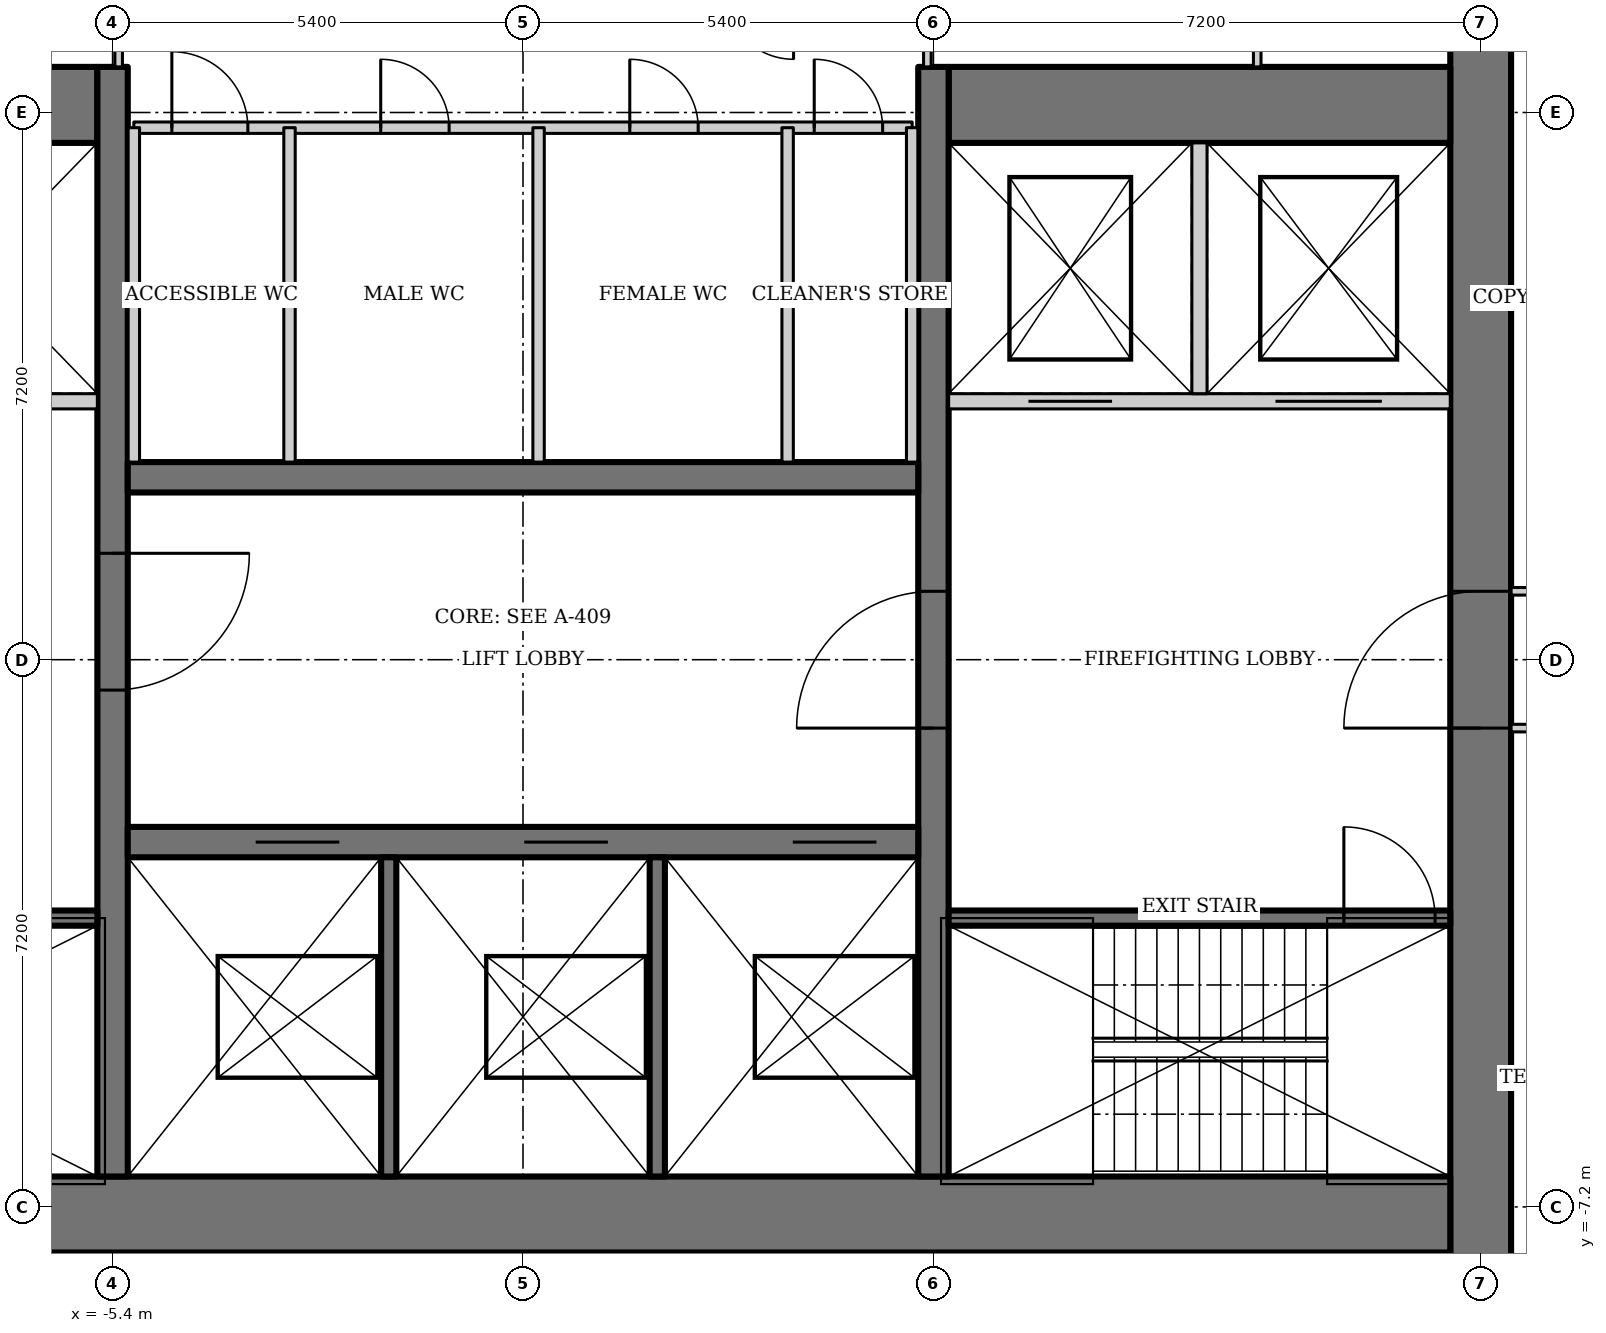
"""IFC4 building model, lengths in metres.
Left out: names, types, materials, properties, quantities, classifications, styles, units other than length and angle.
Written with IfcOpenShell. Run it as: python <this file> out.ifc"""

import sys

from ifc_helpers import new_model, si_unit, direction, frame, frame_2d, origin, place, context, subcontext, project, spatial, rectangle, extrude, element, fill, save


model = new_model("IFC4")
c1 = context("Model", 3, precision=1e-05, world=origin(), true_north=direction((0.0, 1.0)))
c2 = subcontext(c1, "Body", "Model", "MODEL_VIEW")
j1 = project(units=[si_unit("LENGTHUNIT", "METRE"), si_unit("PLANEANGLEUNIT", "RADIAN")], contexts=[c1])
p1 = place(None, origin())
s1 = spatial("IfcSite", under=j1, at=p1, CompositionType="ELEMENT")
p2 = place(p1, origin())
s2 = spatial("IfcBuilding", under=s1, at=p2, CompositionType="ELEMENT")
p3 = place(p2, frame((0.0, 0.0, 266.2)))
s3 = spatial("IfcBuildingStorey", under=s2, at=p3, CompositionType="ELEMENT", Elevation=266.2)
p4 = place(p3, frame((12.6, -11.0, 0.0), z_axis=(0.0, 0.0, 1.0), x_axis=(0.0, 1.0, 0.0)))
e1 = element("IfcWall", 1, at=p4, inside=s3, PredefinedType="SHEAR", context=c2, shape_type="SweptSolid", body=[
    extrude(rectangle(XDim=22.0, YDim=0.8, at=frame_2d((11.0, 0.0))), origin(), (0.0, 0.0, 1.0), 4.2),
])
p5 = place(p4, frame((10.1, 0.0, 0.0)))
e2 = element("IfcOpeningElement", 2, at=p5, cuts=e1, PredefinedType="OPENING", context=c2, shape_type="SweptSolid", body=[
    extrude(rectangle(XDim=1.8, YDim=2.1, at=frame_2d((0.9, 1.05))), frame((0.0, 0.41, 0.0), z_axis=(0.0, -1.0, 0.0), x_axis=(1.0, 0.0, 0.0)), (0.0, 0.0, 1.0), 0.82),
])
p6 = place(p3, frame((-12.2, -7.3, 0.0), z_axis=(0.0, 0.0, 1.0), x_axis=(1.0, 0.0, 0.0)))
e3 = element("IfcWall", 3, at=p6, inside=s3, PredefinedType="SHEAR", context=c2, shape_type="SweptSolid", body=[
    extrude(rectangle(XDim=24.4, YDim=1.0, at=frame_2d((12.2, 0.0))), origin(), (0.0, 0.0, 1.0), 4.2),
])
for number, where, z_axis, x_axis in (
    (4, (12.2, 7.3, 0.0), (0.0, 0.0, 1.0), (-1.0, 0.0, 0.0)),
    (5, (-5.6, 7.3, 0.0), (0.0, 0.0, 1.0), (-1.0, 0.0, 0.0)),
):
    element("IfcWall", number, at=place(p3, frame(where, z_axis=z_axis, x_axis=x_axis)), inside=s3, PredefinedType="SHEAR", context=c2, shape_type="SweptSolid", body=[
        extrude(rectangle(XDim=6.6, YDim=1.0, at=frame_2d((3.3, 0.0))), origin(), (0.0, 0.0, 1.0), 4.2),
    ])
p7 = place(p3, frame((5.4, -6.8, 0.0), z_axis=(0.0, 0.0, 1.0), x_axis=(0.0, 1.0, 0.0)))
e6 = element("IfcWall", 6, at=p7, inside=s3, PredefinedType="SHEAR", context=c2, shape_type="SweptSolid", body=[
    extrude(rectangle(XDim=14.6, YDim=0.4, at=frame_2d((7.3, 0.0))), origin(), (0.0, 0.0, 1.0), 4.2),
])
p8 = place(p7, frame((5.9, 0.0, 0.0)))
e7 = element("IfcOpeningElement", 7, at=p8, cuts=e6, PredefinedType="OPENING", context=c2, shape_type="SweptSolid", body=[
    extrude(rectangle(XDim=1.8, YDim=2.1, at=frame_2d((0.9, 1.05))), frame((0.0, 0.21, 0.0), z_axis=(0.0, -1.0, 0.0), x_axis=(1.0, 0.0, 0.0)), (0.0, 0.0, 1.0), 0.42),
])
p9 = place(p3, frame((-5.4, 7.8, 0.0), z_axis=(0.0, 0.0, 1.0), x_axis=(0.0, -1.0, 0.0)))
e8 = element("IfcWall", 8, at=p9, inside=s3, PredefinedType="SHEAR", context=c2, shape_type="SweptSolid", body=[
    extrude(rectangle(XDim=14.6, YDim=0.4, at=frame_2d((7.3, 0.0))), origin(), (0.0, 0.0, 1.0), 4.2),
])
p10 = place(p9, frame((6.4, 0.0, 0.0)))
e9 = element("IfcOpeningElement", 9, at=p10, cuts=e8, PredefinedType="OPENING", context=c2, shape_type="SweptSolid", body=[
    extrude(rectangle(XDim=1.8, YDim=2.1, at=frame_2d((0.9, 1.05))), frame((0.0, 0.21, 0.0), z_axis=(0.0, -1.0, 0.0), x_axis=(1.0, 0.0, 0.0)), (0.0, 0.0, 1.0), 0.42),
])
p11 = place(p3, frame((-5.2, -2.4, 0.0), z_axis=(0.0, 0.0, 1.0), x_axis=(1.0, 0.0, 0.0)))
e10 = element("IfcWall", 10, at=p11, inside=s3, PredefinedType="SHEAR", context=c2, shape_type="SweptSolid", body=[
    extrude(rectangle(XDim=10.4, YDim=0.4, at=frame_2d((5.2, 0.0))), origin(), (0.0, 0.0, 1.0), 4.2),
])
p12 = place(p11, frame((1.683, 0.0, 0.0)))
e11 = element("IfcOpeningElement", 11, at=p12, cuts=e10, PredefinedType="OPENING", context=c2, shape_type="SweptSolid", body=[
    extrude(rectangle(XDim=1.1, YDim=2.2, at=frame_2d((0.55, 1.1))), frame((0.0, 0.21, 0.0), z_axis=(0.0, -1.0, 0.0), x_axis=(1.0, 0.0, 0.0)), (0.0, 0.0, 1.0), 0.42),
])
p13 = place(p11, frame((5.217, 0.0, 0.0)))
e12 = element("IfcOpeningElement", 12, at=p13, cuts=e10, PredefinedType="OPENING", context=c2, shape_type="SweptSolid", body=[
    extrude(rectangle(XDim=1.1, YDim=2.2, at=frame_2d((0.55, 1.1))), frame((0.0, 0.21, 0.0), z_axis=(0.0, -1.0, 0.0), x_axis=(1.0, 0.0, 0.0)), (0.0, 0.0, 1.0), 0.42),
])
p14 = place(p11, frame((8.75, 0.0, 0.0)))
e13 = element("IfcOpeningElement", 13, at=p14, cuts=e10, PredefinedType="OPENING", context=c2, shape_type="SweptSolid", body=[
    extrude(rectangle(XDim=1.1, YDim=2.2, at=frame_2d((0.55, 1.1))), frame((0.0, 0.21, 0.0), z_axis=(0.0, -1.0, 0.0), x_axis=(1.0, 0.0, 0.0)), (0.0, 0.0, 1.0), 0.42),
])
for number, where, z_axis, x_axis in (
    (14, (-1.767, -2.6, 0.0), (0.0, 0.0, 1.0), (0.0, -1.0, 0.0)),
    (15, (1.767, -2.6, 0.0), (0.0, 0.0, 1.0), (0.0, -1.0, 0.0)),
):
    element("IfcWall", number, at=place(p3, frame(where, z_axis=z_axis, x_axis=x_axis)), inside=s3, PredefinedType="SOLIDWALL", context=c2, shape_type="SweptSolid", body=[
        extrude(rectangle(XDim=4.2, YDim=0.2, at=frame_2d((2.1, 0.0))), origin(), (0.0, 0.0, 1.0), 4.2),
    ])
p15 = place(p3, frame((5.2, 2.4, 0.0), z_axis=(0.0, 0.0, 1.0), x_axis=(-1.0, 0.0, 0.0)))
e16 = element("IfcWall", 16, at=p15, inside=s3, PredefinedType="SHEAR", context=c2, shape_type="SweptSolid", body=[
    extrude(rectangle(XDim=10.4, YDim=0.4, at=frame_2d((5.2, 0.0))), origin(), (0.0, 0.0, 1.0), 4.2),
])
p16 = place(p3, frame((5.6, -3.4, 0.0), z_axis=(0.0, 0.0, 1.0), x_axis=(1.0, 0.0, 0.0)))
e17 = element("IfcWall", 17, at=p16, inside=s3, PredefinedType="SHEAR", context=c2, shape_type="SweptSolid", body=[
    extrude(rectangle(XDim=6.6, YDim=0.2, at=frame_2d((3.3, 0.0))), origin(), (0.0, 0.0, 1.0), 4.2),
])
p17 = place(p16, frame((5.2, 0.0, 0.0)))
e18 = element("IfcOpeningElement", 18, at=p17, cuts=e17, PredefinedType="OPENING", context=c2, shape_type="SweptSolid", body=[
    extrude(rectangle(XDim=1.2, YDim=2.1, at=frame_2d((0.6, 1.05))), frame((0.0, 0.11, 0.0), z_axis=(0.0, -1.0, 0.0), x_axis=(1.0, 0.0, 0.0)), (0.0, 0.0, 1.0), 0.22),
])
p18 = place(p3, frame((12.2, 3.4, 0.0), z_axis=(0.0, 0.0, 1.0), x_axis=(-1.0, 0.0, 0.0)))
e19 = element("IfcWall", 19, at=p18, inside=s3, PredefinedType="SOLIDWALL", context=c2, shape_type="SweptSolid", body=[
    extrude(rectangle(XDim=6.6, YDim=0.2, at=frame_2d((3.3, 0.0))), origin(), (0.0, 0.0, 1.0), 4.2),
])
p19 = place(p18, frame((4.45, 0.0, 0.0)))
e20 = element("IfcOpeningElement", 20, at=p19, cuts=e19, PredefinedType="OPENING", context=c2, shape_type="SweptSolid", body=[
    extrude(rectangle(XDim=1.1, YDim=2.2, at=frame_2d((0.55, 1.1))), frame((0.0, 0.11, 0.0), z_axis=(0.0, -1.0, 0.0), x_axis=(1.0, 0.0, 0.0)), (0.0, 0.0, 1.0), 0.22),
])
p20 = place(p18, frame((0.9, 0.0, 0.0)))
e21 = element("IfcOpeningElement", 21, at=p20, cuts=e19, PredefinedType="OPENING", context=c2, shape_type="SweptSolid", body=[
    extrude(rectangle(XDim=1.4, YDim=2.2, at=frame_2d((0.7, 1.1))), frame((0.0, 0.11, 0.0), z_axis=(0.0, -1.0, 0.0), x_axis=(1.0, 0.0, 0.0)), (0.0, 0.0, 1.0), 0.22),
])
p21 = place(p3, frame((8.9, 3.5, 0.0), z_axis=(0.0, 0.0, 1.0), x_axis=(0.0, 1.0, 0.0)))
e22 = element("IfcWall", 22, at=p21, inside=s3, PredefinedType="SOLIDWALL", context=c2, shape_type="SweptSolid", body=[
    extrude(rectangle(XDim=3.3, YDim=0.2, at=frame_2d((1.65, 0.0))), origin(), (0.0, 0.0, 1.0), 4.2),
])
p22 = place(p3, frame((-5.6, -3.4, 0.0), z_axis=(0.0, 0.0, 1.0), x_axis=(-1.0, 0.0, 0.0)))
e23 = element("IfcWall", 23, at=p22, inside=s3, PredefinedType="SHEAR", context=c2, shape_type="SweptSolid", body=[
    extrude(rectangle(XDim=6.6, YDim=0.2, at=frame_2d((3.3, 0.0))), origin(), (0.0, 0.0, 1.0), 4.2),
])
p23 = place(p22, frame((5.2, 0.0, 0.0)))
e24 = element("IfcOpeningElement", 24, at=p23, cuts=e23, PredefinedType="OPENING", context=c2, shape_type="SweptSolid", body=[
    extrude(rectangle(XDim=1.2, YDim=2.1, at=frame_2d((0.6, 1.05))), frame((0.0, 0.11, 0.0), z_axis=(0.0, -1.0, 0.0), x_axis=(1.0, 0.0, 0.0)), (0.0, 0.0, 1.0), 0.22),
])
p24 = place(p3, frame((-12.2, 3.4, 0.0), z_axis=(0.0, 0.0, 1.0), x_axis=(1.0, 0.0, 0.0)))
e25 = element("IfcWall", 25, at=p24, inside=s3, PredefinedType="SOLIDWALL", context=c2, shape_type="SweptSolid", body=[
    extrude(rectangle(XDim=6.6, YDim=0.2, at=frame_2d((3.3, 0.0))), origin(), (0.0, 0.0, 1.0), 4.2),
])
p25 = place(p24, frame((1.05, 0.0, 0.0)))
e26 = element("IfcOpeningElement", 26, at=p25, cuts=e25, PredefinedType="OPENING", context=c2, shape_type="SweptSolid", body=[
    extrude(rectangle(XDim=1.1, YDim=2.2, at=frame_2d((0.55, 1.1))), frame((0.0, 0.11, 0.0), z_axis=(0.0, -1.0, 0.0), x_axis=(1.0, 0.0, 0.0)), (0.0, 0.0, 1.0), 0.22),
])
p26 = place(p24, frame((4.3, 0.0, 0.0)))
e27 = element("IfcOpeningElement", 27, at=p26, cuts=e25, PredefinedType="OPENING", context=c2, shape_type="SweptSolid", body=[
    extrude(rectangle(XDim=1.4, YDim=2.2, at=frame_2d((0.7, 1.1))), frame((0.0, 0.11, 0.0), z_axis=(0.0, -1.0, 0.0), x_axis=(1.0, 0.0, 0.0)), (0.0, 0.0, 1.0), 0.22),
])
p27 = place(p3, frame((-5.12, 7.0, 0.0), z_axis=(0.0, 0.0, 1.0), x_axis=(1.0, 0.0, 0.0)))
e28 = element("IfcWall", 28, at=p27, inside=s3, PredefinedType="SOLIDWALL", context=c2, shape_type="SweptSolid", body=[
    extrude(rectangle(XDim=10.24, YDim=0.15, at=frame_2d((5.12, 0.0))), origin(), (0.0, 0.0, 1.0), 4.05),
])
p28 = place(p27, frame((0.5, 0.0, 0.0)))
e29 = element("IfcOpeningElement", 29, at=p28, cuts=e28, PredefinedType="OPENING", context=c2, shape_type="SweptSolid", body=[
    extrude(rectangle(XDim=1.0, YDim=2.1, at=frame_2d((0.5, 1.05))), frame((0.0, 0.085, 0.0), z_axis=(0.0, -1.0, 0.0), x_axis=(1.0, 0.0, 0.0)), (0.0, 0.0, 1.0), 0.17),
])
p29 = place(p27, frame((3.248, 0.0, 0.0)))
e30 = element("IfcOpeningElement", 30, at=p29, cuts=e28, PredefinedType="OPENING", context=c2, shape_type="SweptSolid", body=[
    extrude(rectangle(XDim=0.9, YDim=2.1, at=frame_2d((0.45, 1.05))), frame((0.0, 0.085, 0.0), z_axis=(0.0, -1.0, 0.0), x_axis=(1.0, 0.0, 0.0)), (0.0, 0.0, 1.0), 0.17),
])
p30 = place(p27, frame((6.525, 0.0, 0.0)))
e31 = element("IfcOpeningElement", 31, at=p30, cuts=e28, PredefinedType="OPENING", context=c2, shape_type="SweptSolid", body=[
    extrude(rectangle(XDim=0.9, YDim=2.1, at=frame_2d((0.45, 1.05))), frame((0.0, 0.085, 0.0), z_axis=(0.0, -1.0, 0.0), x_axis=(1.0, 0.0, 0.0)), (0.0, 0.0, 1.0), 0.17),
])
p31 = place(p27, frame((8.952, 0.0, 0.0)))
e32 = element("IfcOpeningElement", 32, at=p31, cuts=e28, PredefinedType="OPENING", context=c2, shape_type="SweptSolid", body=[
    extrude(rectangle(XDim=0.9, YDim=2.1, at=frame_2d((0.45, 1.05))), frame((0.0, 0.085, 0.0), z_axis=(0.0, -1.0, 0.0), x_axis=(1.0, 0.0, 0.0)), (0.0, 0.0, 1.0), 0.17),
])
for number, where, z_axis, x_axis in (
    (33, (-5.12, 2.6, 0.0), (0.0, 0.0, 1.0), (0.0, 1.0, 0.0)),
    (34, (5.12, 2.6, 0.0), (0.0, 0.0, 1.0), (0.0, 1.0, 0.0)),
    (35, (-3.072, 2.6, 0.0), (0.0, 0.0, 1.0), (0.0, 1.0, 0.0)),
    (36, (0.205, 2.6, 0.0), (0.0, 0.0, 1.0), (0.0, 1.0, 0.0)),
    (37, (3.482, 2.6, 0.0), (0.0, 0.0, 1.0), (0.0, 1.0, 0.0)),
):
    element("IfcWall", number, at=place(p3, frame(where, z_axis=z_axis, x_axis=x_axis)), inside=s3, PredefinedType="SOLIDWALL", context=c2, shape_type="SweptSolid", body=[
        extrude(rectangle(XDim=4.4, YDim=0.15, at=frame_2d((2.2, 0.0))), origin(), (0.0, 0.0, 1.0), 4.05),
    ])
p32 = place(p3, frame((5.32, 7.8, 0.0), z_axis=(0.0, 0.0, 1.0), x_axis=(0.0, 1.0, 0.0)))
e38 = element("IfcWall", 38, at=p32, inside=s3, PredefinedType="PARTITIONING", context=c2, shape_type="SweptSolid", body=[
    extrude(rectangle(XDim=1.0, YDim=0.1, at=frame_2d((0.5, 0.0))), origin(), (0.0, 0.0, 1.0), 4.05),
])
p33 = place(p3, frame((9.66, 10.017, 0.0), z_axis=(0.0, 0.0, 1.0), x_axis=(0.0, -1.0, 0.0)))
e39 = element("IfcWall", 39, at=p33, inside=s3, PredefinedType="PARTITIONING", context=c2, shape_type="SweptSolid", body=[
    extrude(rectangle(XDim=2.217, YDim=0.1, at=frame_2d((1.108, 0.0))), origin(), (0.0, 0.0, 1.0), 4.05),
])
p34 = place(p3, frame((-5.32, 8.8, 0.0), z_axis=(0.0, 0.0, 1.0), x_axis=(0.0, -1.0, 0.0)))
e40 = element("IfcWall", 40, at=p34, inside=s3, PredefinedType="PARTITIONING", context=c2, shape_type="SweptSolid", body=[
    extrude(rectangle(XDim=1.0, YDim=0.1, at=frame_2d((0.5, 0.0))), origin(), (0.0, 0.0, 1.0), 4.05),
])
p35 = place(p3, frame((13.0, -0.9, 0.0), z_axis=(0.0, 0.0, 1.0), x_axis=(1.0, 0.0, 0.0)))
e41 = element("IfcWall", 41, at=p35, inside=s3, PredefinedType="PARTITIONING", context=c2, shape_type="SweptSolid", body=[
    extrude(rectangle(XDim=2.165, YDim=0.1, at=frame_2d((1.083, 0.0))), origin(), (0.0, 0.0, 1.0), 4.05),
])
p36 = place(p35, frame((1.15, 0.0, 0.0)))
e42 = element("IfcOpeningElement", 42, at=p36, cuts=e41, PredefinedType="OPENING", context=c2, shape_type="SweptSolid", body=[
    extrude(rectangle(XDim=0.9, YDim=2.1, at=frame_2d((0.45, 1.05))), frame((0.0, 0.06, 0.0), z_axis=(0.0, -1.0, 0.0), x_axis=(1.0, 0.0, 0.0)), (0.0, 0.0, 1.0), 0.12),
])
p37 = place(p3, frame((15.165, 0.9, 0.0), z_axis=(0.0, 0.0, 1.0), x_axis=(-1.0, 0.0, 0.0)))
e43 = element("IfcWall", 43, at=p37, inside=s3, PredefinedType="PARTITIONING", context=c2, shape_type="SweptSolid", body=[
    extrude(rectangle(XDim=2.165, YDim=0.1, at=frame_2d((1.083, 0.0))), origin(), (0.0, 0.0, 1.0), 4.05),
])
p38 = place(p37, frame((0.1, 0.0, 0.0)))
e44 = element("IfcOpeningElement", 44, at=p38, cuts=e43, PredefinedType="OPENING", context=c2, shape_type="SweptSolid", body=[
    extrude(rectangle(XDim=0.9, YDim=2.1, at=frame_2d((0.45, 1.05))), frame((0.0, 0.06, 0.0), z_axis=(0.0, -1.0, 0.0), x_axis=(1.0, 0.0, 0.0)), (0.0, 0.0, 1.0), 0.12),
])
p39 = place(p8, origin())
e45 = element("IfcDoor", 45, at=p39, inside=s3, OperationType="DOUBLE_DOOR_DOUBLE_SWING", PredefinedType="DOOR", context=c2, shape_type="SweptSolid", body=[
    extrude(rectangle(XDim=1.8, YDim=2.1, at=frame_2d((0.9, 1.05))), frame((0.0, 0.025, 0.0), z_axis=(0.0, -1.0, 0.0), x_axis=(1.0, 0.0, 0.0)), (0.0, 0.0, 1.0), 0.05),
])
fill(e7, e45)
p40 = place(p10, origin())
e46 = element("IfcDoor", 46, at=p40, inside=s3, OperationType="DOUBLE_DOOR_DOUBLE_SWING", PredefinedType="DOOR", context=c2, shape_type="SweptSolid", body=[
    extrude(rectangle(XDim=1.8, YDim=2.1, at=frame_2d((0.9, 1.05))), frame((0.0, 0.025, 0.0), z_axis=(0.0, -1.0, 0.0), x_axis=(1.0, 0.0, 0.0)), (0.0, 0.0, 1.0), 0.05),
])
fill(e9, e46)
p41 = place(p17, origin())
e47 = element("IfcDoor", 47, at=p41, inside=s3, OperationType="SINGLE_SWING_RIGHT", PredefinedType="DOOR", context=c2, shape_type="SweptSolid", body=[
    extrude(rectangle(XDim=1.2, YDim=2.1, at=frame_2d((0.6, 1.05))), frame((0.0, 0.025, 0.0), z_axis=(0.0, -1.0, 0.0), x_axis=(1.0, 0.0, 0.0)), (0.0, 0.0, 1.0), 0.05),
])
fill(e18, e47)
p42 = place(p5, origin())
e48 = element("IfcDoor", 48, at=p42, inside=s3, OperationType="DOUBLE_DOOR_DOUBLE_SWING", PredefinedType="DOOR", context=c2, shape_type="SweptSolid", body=[
    extrude(rectangle(XDim=1.8, YDim=2.1, at=frame_2d((0.9, 1.05))), frame((0.0, 0.025, 0.0), z_axis=(0.0, -1.0, 0.0), x_axis=(1.0, 0.0, 0.0)), (0.0, 0.0, 1.0), 0.05),
])
fill(e2, e48)
p43 = place(p12, origin())
e49 = element("IfcDoor", 49, at=p43, inside=s3, OperationType="DOUBLE_DOOR_SLIDING", PredefinedType="DOOR", context=c2, shape_type="SweptSolid", body=[
    extrude(rectangle(XDim=1.1, YDim=2.2, at=frame_2d((0.55, 1.1))), frame((0.0, 0.025, 0.0), z_axis=(0.0, -1.0, 0.0), x_axis=(1.0, 0.0, 0.0)), (0.0, 0.0, 1.0), 0.05),
])
fill(e11, e49)
p44 = place(p13, origin())
e50 = element("IfcDoor", 50, at=p44, inside=s3, OperationType="DOUBLE_DOOR_SLIDING", PredefinedType="DOOR", context=c2, shape_type="SweptSolid", body=[
    extrude(rectangle(XDim=1.1, YDim=2.2, at=frame_2d((0.55, 1.1))), frame((0.0, 0.025, 0.0), z_axis=(0.0, -1.0, 0.0), x_axis=(1.0, 0.0, 0.0)), (0.0, 0.0, 1.0), 0.05),
])
fill(e12, e50)
p45 = place(p14, origin())
e51 = element("IfcDoor", 51, at=p45, inside=s3, OperationType="DOUBLE_DOOR_SLIDING", PredefinedType="DOOR", context=c2, shape_type="SweptSolid", body=[
    extrude(rectangle(XDim=1.1, YDim=2.2, at=frame_2d((0.55, 1.1))), frame((0.0, 0.025, 0.0), z_axis=(0.0, -1.0, 0.0), x_axis=(1.0, 0.0, 0.0)), (0.0, 0.0, 1.0), 0.05),
])
fill(e13, e51)
p46 = place(p19, origin())
e52 = element("IfcDoor", 52, at=p46, inside=s3, OperationType="DOUBLE_DOOR_SLIDING", PredefinedType="DOOR", context=c2, shape_type="SweptSolid", body=[
    extrude(rectangle(XDim=1.1, YDim=2.2, at=frame_2d((0.55, 1.1))), frame((0.0, 0.025, 0.0), z_axis=(0.0, -1.0, 0.0), x_axis=(1.0, 0.0, 0.0)), (0.0, 0.0, 1.0), 0.05),
])
fill(e20, e52)
p47 = place(p20, origin())
e53 = element("IfcDoor", 53, at=p47, inside=s3, OperationType="DOUBLE_DOOR_SLIDING", PredefinedType="DOOR", context=c2, shape_type="SweptSolid", body=[
    extrude(rectangle(XDim=1.4, YDim=2.2, at=frame_2d((0.7, 1.1))), frame((0.0, 0.025, 0.0), z_axis=(0.0, -1.0, 0.0), x_axis=(1.0, 0.0, 0.0)), (0.0, 0.0, 1.0), 0.05),
])
fill(e21, e53)
p48 = place(p28, origin())
e54 = element("IfcDoor", 54, at=p48, inside=s3, OperationType="SINGLE_SWING_LEFT", PredefinedType="DOOR", context=c2, shape_type="SweptSolid", body=[
    extrude(rectangle(XDim=1.0, YDim=2.1, at=frame_2d((0.5, 1.05))), frame((0.0, 0.025, 0.0), z_axis=(0.0, -1.0, 0.0), x_axis=(1.0, 0.0, 0.0)), (0.0, 0.0, 1.0), 0.05),
])
fill(e29, e54)
p49 = place(p29, origin())
e55 = element("IfcDoor", 55, at=p49, inside=s3, OperationType="SINGLE_SWING_LEFT", PredefinedType="DOOR", context=c2, shape_type="SweptSolid", body=[
    extrude(rectangle(XDim=0.9, YDim=2.1, at=frame_2d((0.45, 1.05))), frame((0.0, 0.025, 0.0), z_axis=(0.0, -1.0, 0.0), x_axis=(1.0, 0.0, 0.0)), (0.0, 0.0, 1.0), 0.05),
])
fill(e30, e55)
p50 = place(p30, origin())
e56 = element("IfcDoor", 56, at=p50, inside=s3, OperationType="SINGLE_SWING_LEFT", PredefinedType="DOOR", context=c2, shape_type="SweptSolid", body=[
    extrude(rectangle(XDim=0.9, YDim=2.1, at=frame_2d((0.45, 1.05))), frame((0.0, 0.025, 0.0), z_axis=(0.0, -1.0, 0.0), x_axis=(1.0, 0.0, 0.0)), (0.0, 0.0, 1.0), 0.05),
])
fill(e31, e56)
p51 = place(p31, origin())
e57 = element("IfcDoor", 57, at=p51, inside=s3, OperationType="SINGLE_SWING_LEFT", PredefinedType="DOOR", context=c2, shape_type="SweptSolid", body=[
    extrude(rectangle(XDim=0.9, YDim=2.1, at=frame_2d((0.45, 1.05))), frame((0.0, 0.025, 0.0), z_axis=(0.0, -1.0, 0.0), x_axis=(1.0, 0.0, 0.0)), (0.0, 0.0, 1.0), 0.05),
])
fill(e32, e57)
save(model, sys.argv[1])
